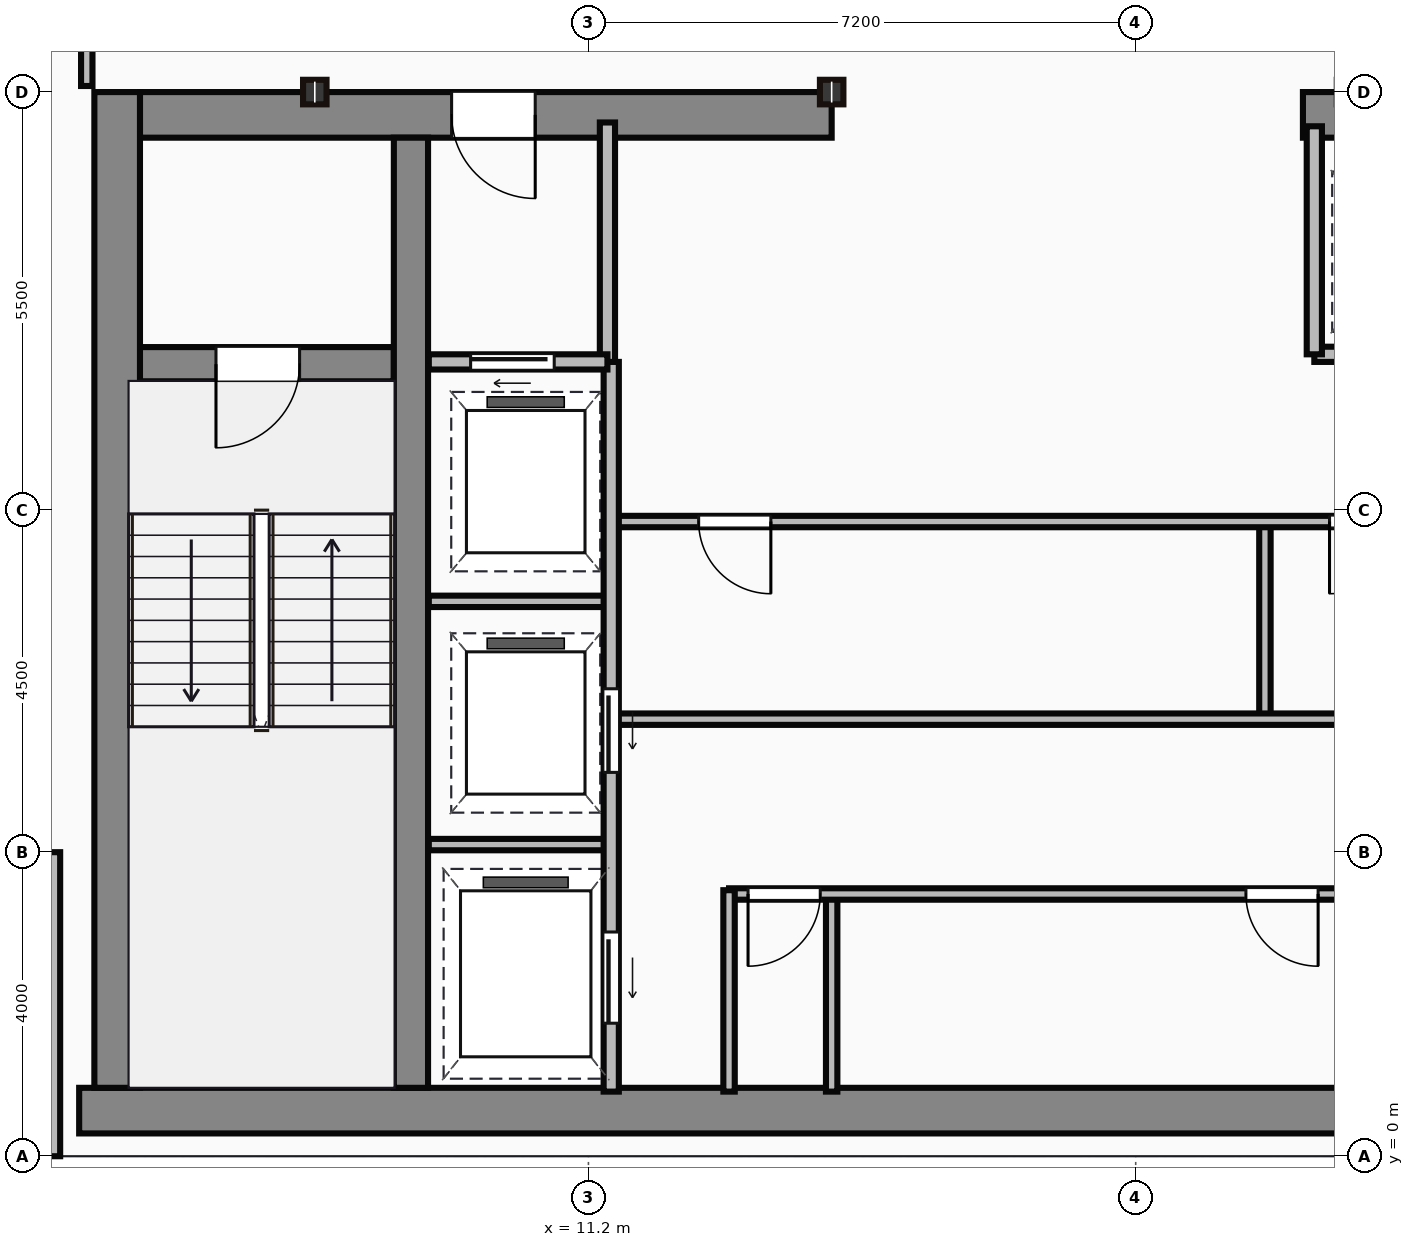
"""IFC4 building model, lengths in metres.
Left out: names, types, materials, properties, quantities, classifications, styles, units other than length and angle.
Written with IfcOpenShell. Run it as: python <this file> out.ifc"""

import sys

from ifc_helpers import new_model, si_unit, direction, frame, frame_2d, origin, origin_2d, place, context, subcontext, project, spatial, rectangle, i_section, extrude, source, transform, mapped, element, fill, save


model = new_model("IFC4")
c1 = context("Model", 3, precision=1e-05, world=origin(), true_north=direction((0.0, 1.0)))
c2 = subcontext(c1, "Body", "Model", "MODEL_VIEW")
j1 = project(units=[si_unit("LENGTHUNIT", "METRE"), si_unit("PLANEANGLEUNIT", "RADIAN")], contexts=[c1])
p1 = place(None, origin())
s1 = spatial("IfcSite", under=j1, at=p1, CompositionType="ELEMENT")
p2 = place(p1, origin())
s2 = spatial("IfcBuilding", under=s1, at=p2, CompositionType="ELEMENT")
p3 = place(p2, frame((0.0, 0.0, 195.9)))
s3 = spatial("IfcBuildingStorey", under=s2, at=p3, CompositionType="ELEMENT", Elevation=195.9)
m1 = source(origin(), c2, "Body", "SweptSolid", [
    extrude(rectangle(XDim=29.5, YDim=0.6, at=frame_2d((14.75, 0.0))), origin(), (0.0, 0.0, 1.0), 3.65),
])
p4 = place(p3, frame((4.5, 0.6, 0.0), z_axis=(0.0, 0.0, 1.0), x_axis=(1.0, 0.0, 0.0)))
e1 = element("IfcWall", 1, at=p4, inside=s3, PredefinedType="SHEAR", context=c2, shape_type="MappedRepresentation", body=[
    mapped(m1, transform((0.0, 0.0, 0.0))),
])
m2 = source(origin(), c2, "Body", "SweptSolid", [
    extrude(rectangle(XDim=13.1, YDim=0.6, at=frame_2d((6.55, 0.0))), origin(), (0.0, 0.0, 1.0), 3.65),
])
p5 = place(p3, frame((5.0, 0.9, 0.0), z_axis=(0.0, 0.0, 1.0), x_axis=(0.0, 1.0, 0.0)))
e2 = element("IfcWall", 2, at=p5, inside=s3, PredefinedType="SHEAR", context=c2, shape_type="MappedRepresentation", body=[
    mapped(m2, transform((0.0, 0.0, 0.0))),
])
m3 = source(origin(), c2, "Body", "SweptSolid", [
    extrude(rectangle(XDim=9.1, YDim=0.6, at=frame_2d((4.55, 0.0))), origin(), (0.0, 0.0, 1.0), 3.65),
])
p6 = place(p3, frame((5.3, 13.7, 0.0), z_axis=(0.0, 0.0, 1.0), x_axis=(1.0, 0.0, 0.0)))
e3 = element("IfcWall", 3, at=p6, inside=s3, PredefinedType="SHEAR", context=c2, shape_type="MappedRepresentation", body=[
    mapped(m3, transform((0.0, 0.0, 0.0))),
])
p7 = place(p6, frame((4.1, 0.0, 0.0)))
e4 = element("IfcOpeningElement", 4, at=p7, cuts=e3, PredefinedType="OPENING", context=c2, shape_type="SweptSolid", body=[
    extrude(rectangle(XDim=1.1, YDim=2.15, at=frame_2d((0.55, 1.075))), frame((0.0, 0.31, 0.0), z_axis=(0.0, -1.0, 0.0), x_axis=(1.0, 0.0, 0.0)), (0.0, 0.0, 1.0), 0.62),
])
m4 = source(origin(), c2, "Body", "SweptSolid", [
    extrude(rectangle(XDim=12.6, YDim=0.6, at=frame_2d((6.3, 0.0))), origin(), (0.0, 0.0, 1.0), 3.65),
])
p8 = place(p3, frame((20.6, 13.7, 0.0), z_axis=(0.0, 0.0, 1.0), x_axis=(1.0, 0.0, 0.0)))
e5 = element("IfcWall", 5, at=p8, inside=s3, PredefinedType="SHEAR", context=c2, shape_type="MappedRepresentation", body=[
    mapped(m4, transform((0.0, 0.0, 0.0))),
])
p9 = place(p8, frame((9.25, 0.0, 0.0)))
e6 = element("IfcOpeningElement", 6, at=p9, cuts=e5, PredefinedType="OPENING", context=c2, shape_type="SweptSolid", body=[
    extrude(rectangle(XDim=1.1, YDim=2.15, at=frame_2d((0.55, 1.075))), frame((0.0, 0.31, 0.0), z_axis=(0.0, -1.0, 0.0), x_axis=(1.0, 0.0, 0.0)), (0.0, 0.0, 1.0), 0.62),
])
m5 = source(origin(), c2, "Body", "SweptSolid", [
    extrude(rectangle(XDim=12.5, YDim=0.45, at=frame_2d((6.25, 0.0))), origin(), (0.0, 0.0, 1.0), 3.65),
])
p10 = place(p3, frame((8.865, 0.9, 0.0), z_axis=(0.0, 0.0, 1.0), x_axis=(0.0, 1.0, 0.0)))
e7 = element("IfcWall", 7, at=p10, inside=s3, PredefinedType="SHEAR", context=c2, shape_type="MappedRepresentation", body=[
    mapped(m5, transform((0.0, 0.0, 0.0))),
])
m6 = source(origin(), c2, "Body", "SweptSolid", [
    extrude(rectangle(XDim=3.39, YDim=0.45, at=frame_2d((1.695, 0.0))), origin(), (0.0, 0.0, 1.0), 3.65),
])
p11 = place(p3, frame((5.25, 10.42, 0.0), z_axis=(0.0, 0.0, 1.0), x_axis=(1.0, 0.0, 0.0)))
e8 = element("IfcWall", 8, at=p11, inside=s3, PredefinedType="SHEAR", context=c2, shape_type="MappedRepresentation", body=[
    mapped(m6, transform((0.0, 0.0, 0.0))),
])
p12 = place(p11, frame((1.05, 0.0, 0.0)))
e9 = element("IfcOpeningElement", 9, at=p12, cuts=e8, PredefinedType="OPENING", context=c2, shape_type="SweptSolid", body=[
    extrude(rectangle(XDim=1.1, YDim=2.15, at=frame_2d((0.55, 1.075))), frame((0.0, 0.235, 0.0), z_axis=(0.0, -1.0, 0.0), x_axis=(1.0, 0.0, 0.0)), (0.0, 0.0, 1.0), 0.47),
])
m7 = source(origin(), c2, "Body", "SweptSolid", [
    extrude(i_section(OverallWidth=0.309, OverallDepth=0.323, WebThickness=0.014, FlangeThickness=0.023, at=origin_2d()), origin(), (0.0, 0.0, 1.0), 3.65),
])
for number, where, z_axis, x_axis in (
    (10, (7.6, 14.0, 0.0), (0.0, 0.0, 1.0), (1.0, 0.0, 0.0)),
    (11, (14.4, 14.0, 0.0), (0.0, 0.0, 1.0), (1.0, 0.0, 0.0)),
):
    element("IfcColumn", number, at=place(p3, frame(where, z_axis=z_axis, x_axis=x_axis)), inside=s3, PredefinedType="COLUMN", context=c2, shape_type="MappedRepresentation", body=[
        mapped(m7, transform((0.0, 0.0, 0.0))),
    ])
m8 = source(origin(), c2, "Body", "SweptSolid", [
    extrude(rectangle(XDim=4.0, YDim=0.25, at=frame_2d((2.0, 0.0))), origin(), (0.0, 0.0, 1.0), 3.4),
])
p13 = place(p3, frame((4.125, 4.0, 0.0), z_axis=(0.0, 0.0, 1.0), x_axis=(0.0, -1.0, 0.0)))
e12 = element("IfcWall", 12, at=p13, inside=s3, PredefinedType="STANDARD", context=c2, shape_type="MappedRepresentation", body=[
    mapped(m8, transform((0.0, 0.0, 0.0))),
])
m9 = source(origin(), c2, "Body", "SweptSolid", [
    extrude(rectangle(XDim=3.18, YDim=0.2, at=frame_2d((1.59, 0.0))), origin(), (0.0, 0.0, 1.0), 3.4),
])
p14 = place(p3, frame((11.45, 10.42, 0.0), z_axis=(0.0, 0.0, 1.0), x_axis=(0.0, 1.0, 0.0)))
e13 = element("IfcWall", 13, at=p14, inside=s3, PredefinedType="PARTITIONING", context=c2, shape_type="MappedRepresentation", body=[
    mapped(m9, transform((0.0, 0.0, 0.0))),
])
m10 = source(origin(), c2, "Body", "SweptSolid", [
    extrude(rectangle(XDim=2.35, YDim=0.2, at=frame_2d((1.175, 0.0))), origin(), (0.0, 0.0, 1.0), 3.4),
])
p15 = place(p3, frame((9.1, 10.45, 0.0), z_axis=(0.0, 0.0, 1.0), x_axis=(1.0, 0.0, 0.0)))
e14 = element("IfcWall", 14, at=p15, inside=s3, PredefinedType="PARTITIONING", context=c2, shape_type="MappedRepresentation", body=[
    mapped(m10, transform((0.0, 0.0, 0.0))),
])
p16 = place(p15, frame((0.55, 0.0, 0.0)))
e15 = element("IfcOpeningElement", 15, at=p16, cuts=e14, PredefinedType="OPENING", context=c2, shape_type="SweptSolid", body=[
    extrude(rectangle(XDim=1.1, YDim=2.15, at=frame_2d((0.55, 1.075))), frame((0.0, 0.11, 0.0), z_axis=(0.0, -1.0, 0.0), x_axis=(1.0, 0.0, 0.0)), (0.0, 0.0, 1.0), 0.22),
])
m11 = source(origin(), c2, "Body", "SweptSolid", [
    extrude(rectangle(XDim=9.6, YDim=0.2, at=frame_2d((4.8, 0.0))), origin(), (0.0, 0.0, 1.0), 3.4),
])
p17 = place(p3, frame((11.5, 0.85, 0.0), z_axis=(0.0, 0.0, 1.0), x_axis=(0.0, 1.0, 0.0)))
e16 = element("IfcWall", 16, at=p17, inside=s3, PredefinedType="PARTITIONING", context=c2, shape_type="MappedRepresentation", body=[
    mapped(m11, transform((0.0, 0.0, 0.0))),
])
p18 = place(p17, frame((4.2, 0.0, 0.0)))
e17 = element("IfcOpeningElement", 17, at=p18, cuts=e16, PredefinedType="OPENING", context=c2, shape_type="SweptSolid", body=[
    extrude(rectangle(XDim=1.1, YDim=2.15, at=frame_2d((0.55, 1.075))), frame((0.0, 0.11, 0.0), z_axis=(0.0, -1.0, 0.0), x_axis=(1.0, 0.0, 0.0)), (0.0, 0.0, 1.0), 0.22),
])
p19 = place(p17, frame((0.9, 0.0, 0.0)))
e18 = element("IfcOpeningElement", 18, at=p19, cuts=e16, PredefinedType="OPENING", context=c2, shape_type="SweptSolid", body=[
    extrude(rectangle(XDim=1.2, YDim=2.15, at=frame_2d((0.6, 1.075))), frame((0.0, 0.11, 0.0), z_axis=(0.0, -1.0, 0.0), x_axis=(1.0, 0.0, 0.0)), (0.0, 0.0, 1.0), 0.22),
])
m12 = source(origin(), c2, "Body", "SweptSolid", [
    extrude(rectangle(XDim=2.4, YDim=0.15, at=frame_2d((1.2, 0.0))), origin(), (0.0, 0.0, 1.0), 3.4),
])
for number, where, z_axis, x_axis in (
    (19, (9.1, 4.1, 0.0), (0.0, 0.0, 1.0), (1.0, 0.0, 0.0)),
    (20, (9.1, 7.3, 0.0), (0.0, 0.0, 1.0), (1.0, 0.0, 0.0)),
):
    element("IfcWall", number, at=place(p3, frame(where, z_axis=z_axis, x_axis=x_axis)), inside=s3, PredefinedType="PARTITIONING", context=c2, shape_type="MappedRepresentation", body=[
        mapped(m12, transform((0.0, 0.0, 0.0))),
    ])
m13 = source(origin(), c2, "Body", "SweptSolid", [
    extrude(rectangle(XDim=2.65, YDim=0.15, at=frame_2d((1.325, 0.0))), origin(), (0.0, 0.0, 1.0), 3.4),
])
p20 = place(p3, frame((13.05, 0.85, 0.0), z_axis=(0.0, 0.0, 1.0), x_axis=(0.0, 1.0, 0.0)))
e21 = element("IfcWall", 21, at=p20, inside=s3, PredefinedType="PARTITIONING", context=c2, shape_type="MappedRepresentation", body=[
    mapped(m13, transform((0.0, 0.0, 0.0))),
])
m14 = source(origin(), c2, "Body", "SweptSolid", [
    extrude(rectangle(XDim=10.35, YDim=0.15, at=frame_2d((5.175, 0.0))), origin(), (0.0, 0.0, 1.0), 3.4),
])
p21 = place(p3, frame((13.05, 3.45, 0.0), z_axis=(0.0, 0.0, 1.0), x_axis=(1.0, 0.0, 0.0)))
e22 = element("IfcWall", 22, at=p21, inside=s3, PredefinedType="PARTITIONING", context=c2, shape_type="MappedRepresentation", body=[
    mapped(m14, transform((0.0, 0.0, 0.0))),
])
p22 = place(p21, frame((0.25, 0.0, 0.0)))
e23 = element("IfcOpeningElement", 23, at=p22, cuts=e22, PredefinedType="OPENING", context=c2, shape_type="SweptSolid", body=[
    extrude(rectangle(XDim=0.95, YDim=2.15, at=frame_2d((0.475, 1.075))), frame((0.0, 0.085, 0.0), z_axis=(0.0, -1.0, 0.0), x_axis=(1.0, 0.0, 0.0)), (0.0, 0.0, 1.0), 0.17),
])
p23 = place(p21, frame((6.8, 0.0, 0.0)))
e24 = element("IfcOpeningElement", 24, at=p23, cuts=e22, PredefinedType="OPENING", context=c2, shape_type="SweptSolid", body=[
    extrude(rectangle(XDim=0.95, YDim=2.15, at=frame_2d((0.475, 1.075))), frame((0.0, 0.085, 0.0), z_axis=(0.0, -1.0, 0.0), x_axis=(1.0, 0.0, 0.0)), (0.0, 0.0, 1.0), 0.17),
])
m15 = source(origin(), c2, "Body", "SweptSolid", [
    extrude(rectangle(XDim=2.6, YDim=0.15, at=frame_2d((1.3, 0.0))), origin(), (0.0, 0.0, 1.0), 3.4),
])
p24 = place(p3, frame((14.4, 0.85, 0.0), z_axis=(0.0, 0.0, 1.0), x_axis=(0.0, 1.0, 0.0)))
e25 = element("IfcWall", 25, at=p24, inside=s3, PredefinedType="PARTITIONING", context=c2, shape_type="MappedRepresentation", body=[
    mapped(m15, transform((0.0, 0.0, 0.0))),
])
m16 = source(origin(), c2, "Body", "SweptSolid", [
    extrude(rectangle(XDim=11.85, YDim=0.15, at=frame_2d((5.925, 0.0))), origin(), (0.0, 0.0, 1.0), 3.4),
])
p25 = place(p3, frame((11.55, 5.75, 0.0), z_axis=(0.0, 0.0, 1.0), x_axis=(1.0, 0.0, 0.0)))
e26 = element("IfcWall", 26, at=p25, inside=s3, PredefinedType="PARTITIONING", context=c2, shape_type="MappedRepresentation", body=[
    mapped(m16, transform((0.0, 0.0, 0.0))),
])
p26 = place(p3, frame((11.55, 8.35, 0.0), z_axis=(0.0, 0.0, 1.0), x_axis=(1.0, 0.0, 0.0)))
e27 = element("IfcWall", 27, at=p26, inside=s3, PredefinedType="PARTITIONING", context=c2, shape_type="MappedRepresentation", body=[
    mapped(m16, transform((0.0, 0.0, 0.0))),
])
p27 = place(p26, frame((1.1, 0.0, 0.0)))
e28 = element("IfcOpeningElement", 28, at=p27, cuts=e27, PredefinedType="OPENING", context=c2, shape_type="SweptSolid", body=[
    extrude(rectangle(XDim=0.95, YDim=2.15, at=frame_2d((0.475, 1.075))), frame((0.0, 0.085, 0.0), z_axis=(0.0, -1.0, 0.0), x_axis=(1.0, 0.0, 0.0)), (0.0, 0.0, 1.0), 0.17),
])
p28 = place(p26, frame((9.4, 0.0, 0.0)))
e29 = element("IfcOpeningElement", 29, at=p28, cuts=e27, PredefinedType="OPENING", context=c2, shape_type="SweptSolid", body=[
    extrude(rectangle(XDim=0.95, YDim=2.15, at=frame_2d((0.475, 1.075))), frame((0.0, 0.085, 0.0), z_axis=(0.0, -1.0, 0.0), x_axis=(1.0, 0.0, 0.0)), (0.0, 0.0, 1.0), 0.17),
])
m17 = source(origin(), c2, "Body", "SweptSolid", [
    extrude(rectangle(XDim=2.5, YDim=0.15, at=frame_2d((1.25, 0.0))), origin(), (0.0, 0.0, 1.0), 3.4),
])
p29 = place(p3, frame((20.1, 5.8, 0.0), z_axis=(0.0, 0.0, 1.0), x_axis=(0.0, 1.0, 0.0)))
e30 = element("IfcWall", 30, at=p29, inside=s3, PredefinedType="PARTITIONING", context=c2, shape_type="MappedRepresentation", body=[
    mapped(m17, transform((0.0, 0.0, 0.0))),
])
m18 = source(origin(), c2, "Body", "SweptSolid", [
    extrude(rectangle(XDim=8.8, YDim=0.2, at=frame_2d((4.4, 0.0))), origin(), (0.0, 0.0, 1.0), 3.4),
])
p30 = place(p3, frame((20.75, 10.55, 0.0), z_axis=(0.0, 0.0, 1.0), x_axis=(1.0, 0.0, 0.0)))
e31 = element("IfcWall", 31, at=p30, inside=s3, PredefinedType="PARTITIONING", context=c2, shape_type="MappedRepresentation", body=[
    mapped(m18, transform((0.0, 0.0, 0.0))),
])
p31 = place(p30, frame((0.5, 0.0, 0.0)))
e32 = element("IfcOpeningElement", 32, at=p31, cuts=e31, PredefinedType="OPENING", context=c2, shape_type="SweptSolid", body=[
    extrude(rectangle(XDim=1.05, YDim=2.15, at=frame_2d((0.525, 1.075))), frame((0.0, 0.11, 0.0), z_axis=(0.0, -1.0, 0.0), x_axis=(1.0, 0.0, 0.0)), (0.0, 0.0, 1.0), 0.22),
])
p32 = place(p30, frame((2.6, 0.0, 0.0)))
e33 = element("IfcOpeningElement", 33, at=p32, cuts=e31, PredefinedType="OPENING", context=c2, shape_type="SweptSolid", body=[
    extrude(rectangle(XDim=1.05, YDim=2.15, at=frame_2d((0.525, 1.075))), frame((0.0, 0.11, 0.0), z_axis=(0.0, -1.0, 0.0), x_axis=(1.0, 0.0, 0.0)), (0.0, 0.0, 1.0), 0.22),
])
p33 = place(p30, frame((4.7, 0.0, 0.0)))
e34 = element("IfcOpeningElement", 34, at=p33, cuts=e31, PredefinedType="OPENING", context=c2, shape_type="SweptSolid", body=[
    extrude(rectangle(XDim=1.05, YDim=2.15, at=frame_2d((0.525, 1.075))), frame((0.0, 0.11, 0.0), z_axis=(0.0, -1.0, 0.0), x_axis=(1.0, 0.0, 0.0)), (0.0, 0.0, 1.0), 0.22),
])
p34 = place(p30, frame((6.8, 0.0, 0.0)))
e35 = element("IfcOpeningElement", 35, at=p34, cuts=e31, PredefinedType="OPENING", context=c2, shape_type="SweptSolid", body=[
    extrude(rectangle(XDim=1.05, YDim=2.15, at=frame_2d((0.525, 1.075))), frame((0.0, 0.11, 0.0), z_axis=(0.0, -1.0, 0.0), x_axis=(1.0, 0.0, 0.0)), (0.0, 0.0, 1.0), 0.22),
])
m19 = source(origin(), c2, "Body", "SweptSolid", [
    extrude(rectangle(XDim=3.0, YDim=0.2, at=frame_2d((1.5, 0.0))), origin(), (0.0, 0.0, 1.0), 3.4),
])
p35 = place(p3, frame((20.75, 10.55, 0.0), z_axis=(0.0, 0.0, 1.0), x_axis=(0.0, 1.0, 0.0)))
e36 = element("IfcWall", 36, at=p35, inside=s3, PredefinedType="PARTITIONING", context=c2, shape_type="MappedRepresentation", body=[
    mapped(m19, transform((0.0, 0.0, 0.0))),
])
m20 = source(origin(), c2, "Body", "SweptSolid", [
    extrude(rectangle(XDim=2.12, YDim=0.15, at=frame_2d((1.06, 0.0))), origin(), (0.0, 0.0, 1.0), 3.4),
])
p36 = place(p3, frame((4.6, 14.08, 0.0), z_axis=(0.0, 0.0, 1.0), x_axis=(0.0, 1.0, 0.0)))
e37 = element("IfcWall", 37, at=p36, inside=s3, PredefinedType="PARTITIONING", context=c2, shape_type="MappedRepresentation", body=[
    mapped(m20, transform((0.0, 0.0, 0.0))),
])
m21 = source(origin(), c2, "Body", "SweptSolid", [
    extrude(rectangle(XDim=1.1, YDim=2.15, at=frame_2d((0.55, 1.075))), frame((0.0, 0.025, 0.0), z_axis=(0.0, -1.0, 0.0), x_axis=(1.0, 0.0, 0.0)), (0.0, 0.0, 1.0), 0.05),
])
p37 = place(p12, frame((1.1, 0.0, 0.0), z_axis=(0.0, 0.0, 1.0), x_axis=(-1.0, 0.0, 0.0)))
e38 = element("IfcDoor", 38, at=p37, inside=s3, OperationType="SINGLE_SWING_LEFT", PredefinedType="DOOR", context=c2, shape_type="MappedRepresentation", body=[
    mapped(m21, transform((0.0, 0.0, 0.0))),
])
fill(e9, e38)
p38 = place(p7, origin())
e39 = element("IfcDoor", 39, at=p38, inside=s3, OperationType="SINGLE_SWING_RIGHT", PredefinedType="DOOR", context=c2, shape_type="MappedRepresentation", body=[
    mapped(m21, transform((0.0, 0.0, 0.0))),
])
fill(e4, e39)
p39 = place(p16, origin())
e40 = element("IfcDoor", 40, at=p39, inside=s3, OperationType="SLIDING_TO_LEFT", PredefinedType="DOOR", context=c2, shape_type="MappedRepresentation", body=[
    mapped(m21, transform((0.0, 0.0, 0.0))),
])
fill(e15, e40)
p40 = place(p18, frame((1.1, 0.0, 0.0), z_axis=(0.0, 0.0, 1.0), x_axis=(-1.0, 0.0, 0.0)))
e41 = element("IfcDoor", 41, at=p40, inside=s3, OperationType="SLIDING_TO_LEFT", PredefinedType="DOOR", context=c2, shape_type="MappedRepresentation", body=[
    mapped(m21, transform((0.0, 0.0, 0.0))),
])
fill(e17, e41)
m22 = source(origin(), c2, "Body", "SweptSolid", [
    extrude(rectangle(XDim=1.2, YDim=2.15, at=frame_2d((0.6, 1.075))), frame((0.0, 0.025, 0.0), z_axis=(0.0, -1.0, 0.0), x_axis=(1.0, 0.0, 0.0)), (0.0, 0.0, 1.0), 0.05),
])
p41 = place(p19, frame((1.2, 0.0, 0.0), z_axis=(0.0, 0.0, 1.0), x_axis=(-1.0, 0.0, 0.0)))
e42 = element("IfcDoor", 42, at=p41, inside=s3, OperationType="SLIDING_TO_LEFT", PredefinedType="DOOR", context=c2, shape_type="MappedRepresentation", body=[
    mapped(m22, transform((0.0, 0.0, 0.0))),
])
fill(e18, e42)
m23 = source(origin(), c2, "Body", "SweptSolid", [
    extrude(rectangle(XDim=0.95, YDim=2.15, at=frame_2d((0.475, 1.075))), frame((0.0, 0.025, 0.0), z_axis=(0.0, -1.0, 0.0), x_axis=(1.0, 0.0, 0.0)), (0.0, 0.0, 1.0), 0.05),
])
p42 = place(p22, origin())
e43 = element("IfcDoor", 43, at=p42, inside=s3, OperationType="SINGLE_SWING_LEFT", PredefinedType="DOOR", context=c2, shape_type="MappedRepresentation", body=[
    mapped(m23, transform((0.0, 0.0, 0.0))),
])
fill(e23, e43)
p43 = place(p23, origin())
e44 = element("IfcDoor", 44, at=p43, inside=s3, OperationType="SINGLE_SWING_RIGHT", PredefinedType="DOOR", context=c2, shape_type="MappedRepresentation", body=[
    mapped(m23, transform((0.0, 0.0, 0.0))),
])
fill(e24, e44)
p44 = place(p27, origin())
e45 = element("IfcDoor", 45, at=p44, inside=s3, OperationType="SINGLE_SWING_RIGHT", PredefinedType="DOOR", context=c2, shape_type="MappedRepresentation", body=[
    mapped(m23, transform((0.0, 0.0, 0.0))),
])
fill(e28, e45)
p45 = place(p28, origin())
e46 = element("IfcDoor", 46, at=p45, inside=s3, OperationType="SINGLE_SWING_LEFT", PredefinedType="DOOR", context=c2, shape_type="MappedRepresentation", body=[
    mapped(m23, transform((0.0, 0.0, 0.0))),
])
fill(e29, e46)
save(model, sys.argv[1])
